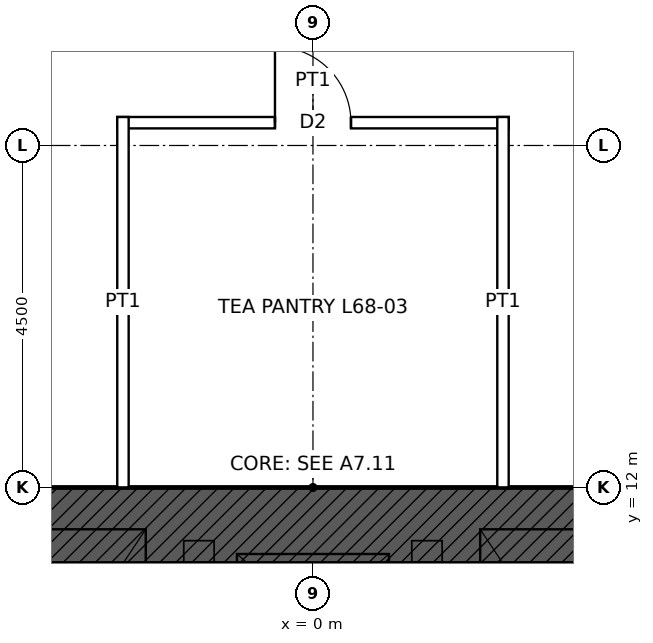
"""IFC4 building model, lengths in metres.
Left out: names, types, materials, properties, quantities, classifications, styles, units other than length and angle.
Written with IfcOpenShell. Run it as: python <this file> out.ifc"""

import sys

from ifc_helpers import new_model, si_unit, direction, frame, frame_2d, origin, place, context, subcontext, project, spatial, rectangle, extrude, element, fill, save


model = new_model("IFC4")
c1 = context("Model", 3, precision=1e-05, world=origin(), true_north=direction((0.0, 1.0)))
c2 = subcontext(c1, "Body", "Model", "MODEL_VIEW")
j1 = project(units=[si_unit("LENGTHUNIT", "METRE"), si_unit("PLANEANGLEUNIT", "RADIAN")], contexts=[c1])
p1 = place(None, origin())
s1 = spatial("IfcSite", under=j1, at=p1, CompositionType="ELEMENT")
p2 = place(p1, origin())
s2 = spatial("IfcBuilding", under=s1, at=p2, CompositionType="ELEMENT")
p3 = place(p2, frame((0.0, 0.0, 307.9)))
s3 = spatial("IfcBuildingStorey", under=s2, at=p3, CompositionType="ELEMENT", Elevation=307.9)
p4 = place(p3, frame((-12.0, 11.5, 0.0), z_axis=(0.0, 0.0, 1.0), x_axis=(1.0, 0.0, 0.0)))
e1 = element("IfcWall", 1, at=p4, inside=s3, PredefinedType="SHEAR", context=c2, shape_type="SweptSolid", body=[
    extrude(rectangle(XDim=24.0, YDim=1.0, at=frame_2d((12.0, 0.0))), origin(), (0.0, 0.0, 1.0), 4.0),
])
p5 = place(p4, frame((6.25, 0.0, 0.0)))
e2 = element("IfcOpeningElement", 2, at=p5, cuts=e1, PredefinedType="OPENING", context=c2, shape_type="SweptSolid", body=[
    extrude(rectangle(XDim=1.0, YDim=2.4, at=frame_2d((0.5, 1.2))), frame((0.0, 0.51, 0.0), z_axis=(0.0, -1.0, 0.0), x_axis=(1.0, 0.0, 0.0)), (0.0, 0.0, 1.0), 1.02),
])
p6 = place(p4, frame((16.75, 0.0, 0.0)))
e3 = element("IfcOpeningElement", 3, at=p6, cuts=e1, PredefinedType="OPENING", context=c2, shape_type="SweptSolid", body=[
    extrude(rectangle(XDim=1.0, YDim=2.4, at=frame_2d((0.5, 1.2))), frame((0.0, 0.51, 0.0), z_axis=(0.0, -1.0, 0.0), x_axis=(1.0, 0.0, 0.0)), (0.0, 0.0, 1.0), 1.02),
])
p7 = place(p3, frame((-2.575, 16.8, 0.0), z_axis=(0.0, 0.0, 1.0), x_axis=(1.0, 0.0, 0.0)))
e4 = element("IfcWall", 4, at=p7, inside=s3, PredefinedType="PARTITIONING", context=c2, shape_type="SweptSolid", body=[
    extrude(rectangle(XDim=5.15, YDim=0.15, at=frame_2d((2.575, 0.0))), origin(), (0.0, 0.0, 1.0), 3.85),
])
p8 = place(p7, frame((2.075, 0.0, 0.0)))
e5 = element("IfcOpeningElement", 5, at=p8, cuts=e4, PredefinedType="OPENING", context=c2, shape_type="SweptSolid", body=[
    extrude(rectangle(XDim=1.0, YDim=2.1, at=frame_2d((0.5, 1.05))), frame((0.0, 0.085, 0.0), z_axis=(0.0, -1.0, 0.0), x_axis=(1.0, 0.0, 0.0)), (0.0, 0.0, 1.0), 0.17),
])
for number, where, z_axis, x_axis in (
    (6, (-2.5, 12.0, 0.0), (0.0, 0.0, 1.0), (0.0, 1.0, 0.0)),
    (7, (2.5, 12.0, 0.0), (0.0, 0.0, 1.0), (0.0, 1.0, 0.0)),
):
    element("IfcWall", number, at=place(p3, frame(where, z_axis=z_axis, x_axis=x_axis)), inside=s3, PredefinedType="PARTITIONING", context=c2, shape_type="SweptSolid", body=[
        extrude(rectangle(XDim=4.875, YDim=0.15, at=frame_2d((2.438, 0.0))), origin(), (0.0, 0.0, 1.0), 3.85),
    ])
p9 = place(p8, origin())
e8 = element("IfcDoor", 8, at=p9, inside=s3, OperationType="SINGLE_SWING_LEFT", PredefinedType="DOOR", context=c2, shape_type="SweptSolid", body=[
    extrude(rectangle(XDim=1.0, YDim=2.1, at=frame_2d((0.5, 1.05))), frame((0.0, 0.025, 0.0), z_axis=(0.0, -1.0, 0.0), x_axis=(1.0, 0.0, 0.0)), (0.0, 0.0, 1.0), 0.05),
])
fill(e5, e8)
save(model, sys.argv[1])
